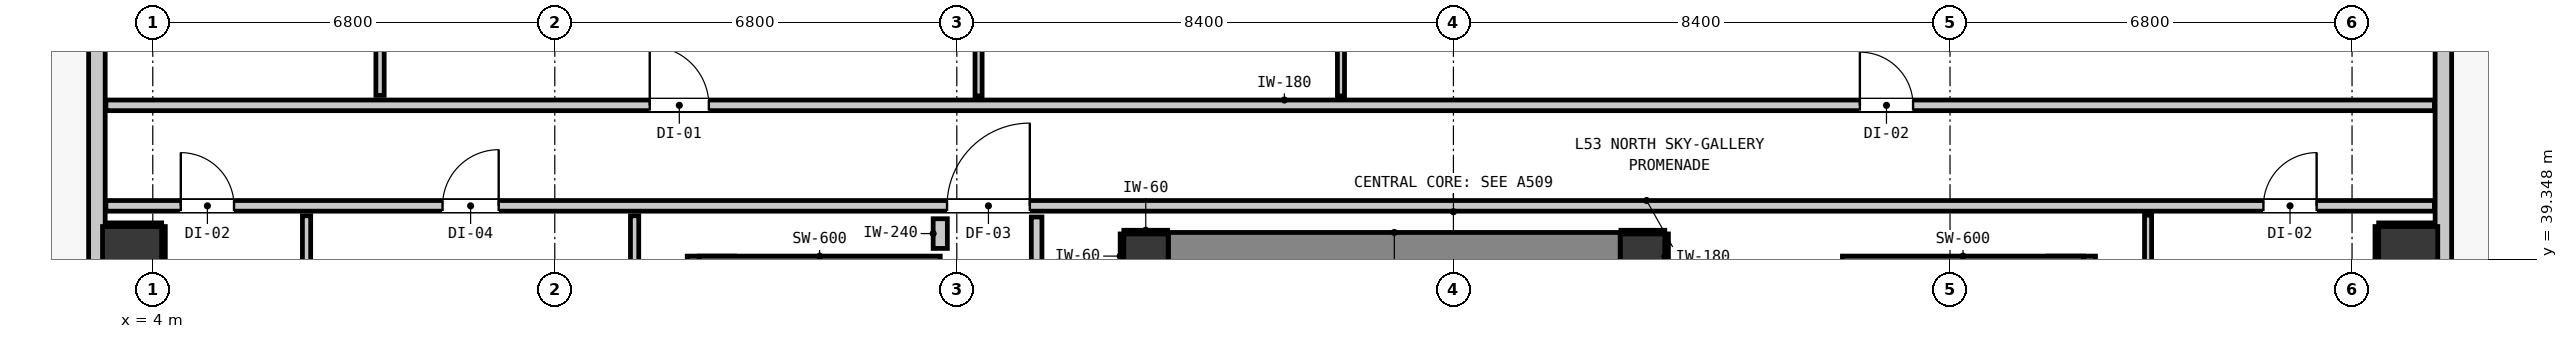
"""IFC4 building model, lengths in metres.
Left out: names, types, materials, properties, quantities, classifications, styles, units other than length and angle.
Written with IfcOpenShell. Run it as: python <this file> out.ifc"""

import sys

from ifc_helpers import new_model, si_unit, direction, frame, frame_2d, origin, origin_2d, place, context, subcontext, project, spatial, rectangle, extrude, element, fill, save


model = new_model("IFC4")
c1 = context("Model", 3, precision=1e-05, world=origin(), true_north=direction((0.0, 1.0)))
c2 = subcontext(c1, "Body", "Model", "MODEL_VIEW")
j1 = project(units=[si_unit("LENGTHUNIT", "METRE"), si_unit("PLANEANGLEUNIT", "RADIAN")], contexts=[c1])
p1 = place(None, origin())
s1 = spatial("IfcSite", under=j1, at=p1, CompositionType="ELEMENT")
p2 = place(p1, origin())
s2 = spatial("IfcBuilding", under=s1, at=p2, CompositionType="ELEMENT")
p3 = place(p2, frame((0.0, 0.0, 183.52)))
s3 = spatial("IfcBuildingStorey", under=s2, at=p3, CompositionType="ELEMENT", Elevation=183.52)
for number, where, z_axis, x_axis in (
    (1, (20.8, 39.4, 0.0), (0.0, 0.0, 1.0), (1.0, 0.0, 0.0)),
    (2, (29.2, 39.4, 0.0), (0.0, 0.0, 1.0), (1.0, 0.0, 0.0)),
):
    element("IfcColumn", number, at=place(p3, frame(where, z_axis=z_axis, x_axis=x_axis)), inside=s3, PredefinedType="COLUMN", context=c2, shape_type="SweptSolid", body=[
        extrude(rectangle(XDim=0.75, YDim=0.75, at=origin_2d()), origin(), (0.0, 0.0, 1.0), 3.32),
    ])
p4 = place(p3, frame((13.44, 31.08, 0.0), z_axis=(0.0, 0.0, 1.0), x_axis=(0.0, 1.0, 0.0)))
e3 = element("IfcWall", 3, at=p4, inside=s3, PredefinedType="SHEAR", context=c2, shape_type="SweptSolid", body=[
    extrude(rectangle(XDim=8.32, YDim=0.8, at=frame_2d((4.16, 0.0))), origin(), (0.0, 0.0, 1.0), 3.32),
])
p5 = place(p3, frame((13.24, 39.1, 0.0), z_axis=(0.0, 0.0, 1.0), x_axis=(1.0, 0.0, 0.0)))
e4 = element("IfcWall", 4, at=p5, inside=s3, PredefinedType="SHEAR", context=c2, shape_type="SweptSolid", body=[
    extrude(rectangle(XDim=4.08, YDim=0.6, at=frame_2d((2.04, 0.0))), origin(), (0.0, 0.0, 1.0), 3.32),
])
p6 = place(p3, frame((36.46, 31.08, 0.0), z_axis=(0.0, 0.0, 1.0), x_axis=(0.0, 1.0, 0.0)))
e5 = element("IfcWall", 5, at=p6, inside=s3, PredefinedType="SHEAR", context=c2, shape_type="SweptSolid", body=[
    extrude(rectangle(XDim=8.32, YDim=0.8, at=frame_2d((4.16, 0.0))), origin(), (0.0, 0.0, 1.0), 3.32),
])
p7 = place(p3, frame((32.58, 39.1, 0.0), z_axis=(0.0, 0.0, 1.0), x_axis=(1.0, 0.0, 0.0)))
e6 = element("IfcWall", 6, at=p7, inside=s3, PredefinedType="SHEAR", context=c2, shape_type="SweptSolid", body=[
    extrude(rectangle(XDim=4.08, YDim=0.6, at=frame_2d((2.04, 0.0))), origin(), (0.0, 0.0, 1.0), 3.32),
])
p8 = place(p3, frame((21.18, 39.4, 0.0), z_axis=(0.0, 0.0, 1.0), x_axis=(1.0, 0.0, 0.0)))
e7 = element("IfcWall", 7, at=p8, inside=s3, PredefinedType="SHEAR", context=c2, shape_type="SweptSolid", body=[
    extrude(rectangle(XDim=7.64, YDim=0.8, at=frame_2d((3.82, 0.0))), origin(), (0.0, 0.0, 1.0), 3.32),
])
for number, where, z_axis, x_axis in (
    (8, (3.65, 39.4, 0.0), (0.0, 0.0, 1.0), (1.0, 0.0, 0.0)),
    (9, (42.15, 39.4, 0.0), (0.0, 0.0, 1.0), (1.0, 0.0, 0.0)),
):
    element("IfcColumn", number, at=place(p3, frame(where, z_axis=z_axis, x_axis=x_axis)), inside=s3, PredefinedType="COLUMN", context=c2, shape_type="SweptSolid", body=[
        extrude(rectangle(XDim=1.0, YDim=1.0, at=origin_2d()), origin(), (0.0, 0.0, 1.0), 3.32),
    ])
p9 = place(p3, frame((3.055, 17.555, 0.0), z_axis=(0.0, 0.0, 1.0), x_axis=(0.0, 1.0, 0.0)))
e10 = element("IfcWall", 10, at=p9, inside=s3, PredefinedType="STANDARD", context=c2, shape_type="SweptSolid", body=[
    extrude(rectangle(XDim=32.29, YDim=0.28, at=frame_2d((16.145, 0.0))), origin(), (0.0, 0.0, 1.0), 3.08),
])
p10 = place(p9, frame((5.467, 0.0, 0.0)))
e11 = element("IfcOpeningElement", 11, at=p10, cuts=e10, PredefinedType="OPENING", context=c2, shape_type="SweptSolid", body=[
    extrude(rectangle(XDim=1.0, YDim=2.15, at=frame_2d((0.5, 1.075))), frame((0.0, 0.15, 0.0), z_axis=(0.0, -1.0, 0.0), x_axis=(1.0, 0.0, 0.0)), (0.0, 0.0, 1.0), 0.3),
])
p11 = place(p9, frame((30.247, 0.0, 0.85)))
e12 = element("IfcOpeningElement", 12, at=p11, cuts=e10, PredefinedType="OPENING", context=c2, shape_type="SweptSolid", body=[
    extrude(rectangle(XDim=1.05, YDim=1.65, at=frame_2d((0.525, 0.825))), frame((0.0, 0.15, 0.0), z_axis=(0.0, -1.0, 0.0), x_axis=(1.0, 0.0, 0.0)), (0.0, 0.0, 1.0), 0.3),
])
p12 = place(p9, frame((9.131, 0.0, 0.85)))
e13 = element("IfcOpeningElement", 13, at=p12, cuts=e10, PredefinedType="OPENING", context=c2, shape_type="SweptSolid", body=[
    extrude(rectangle(XDim=1.05, YDim=1.65, at=frame_2d((0.525, 0.825))), frame((0.0, 0.15, 0.0), z_axis=(0.0, -1.0, 0.0), x_axis=(1.0, 0.0, 0.0)), (0.0, 0.0, 1.0), 0.3),
])
p13 = place(p3, frame((42.745, 49.845, 0.0), z_axis=(0.0, 0.0, 1.0), x_axis=(0.0, -1.0, 0.0)))
e14 = element("IfcWall", 14, at=p13, inside=s3, PredefinedType="STANDARD", context=c2, shape_type="SweptSolid", body=[
    extrude(rectangle(XDim=32.29, YDim=0.28, at=frame_2d((16.145, 0.0))), origin(), (0.0, 0.0, 1.0), 3.08),
])
p14 = place(p13, frame((0.904, 0.0, 0.0)))
e15 = element("IfcOpeningElement", 15, at=p14, cuts=e14, PredefinedType="OPENING", context=c2, shape_type="SweptSolid", body=[
    extrude(rectangle(XDim=1.0, YDim=2.15, at=frame_2d((0.5, 1.075))), frame((0.0, 0.15, 0.0), z_axis=(0.0, -1.0, 0.0), x_axis=(1.0, 0.0, 0.0)), (0.0, 0.0, 1.0), 0.3),
])
p15 = place(p13, frame((30.822, 0.0, 0.85)))
e16 = element("IfcOpeningElement", 16, at=p15, cuts=e14, PredefinedType="OPENING", context=c2, shape_type="SweptSolid", body=[
    extrude(rectangle(XDim=1.05, YDim=1.65, at=frame_2d((0.525, 0.825))), frame((0.0, 0.15, 0.0), z_axis=(0.0, -1.0, 0.0), x_axis=(1.0, 0.0, 0.0)), (0.0, 0.0, 1.0), 0.3),
])
p16 = place(p13, frame((4.424, 0.0, 0.85)))
e17 = element("IfcOpeningElement", 17, at=p16, cuts=e14, PredefinedType="OPENING", context=c2, shape_type="SweptSolid", body=[
    extrude(rectangle(XDim=1.05, YDim=1.65, at=frame_2d((0.525, 0.825))), frame((0.0, 0.15, 0.0), z_axis=(0.0, -1.0, 0.0), x_axis=(1.0, 0.0, 0.0)), (0.0, 0.0, 1.0), 0.3),
])
p17 = place(p13, frame((24.724, 0.0, 0.85)))
e18 = element("IfcOpeningElement", 18, at=p17, cuts=e14, PredefinedType="OPENING", context=c2, shape_type="SweptSolid", body=[
    extrude(rectangle(XDim=1.05, YDim=1.65, at=frame_2d((0.525, 0.825))), frame((0.0, 0.15, 0.0), z_axis=(0.0, -1.0, 0.0), x_axis=(1.0, 0.0, 0.0)), (0.0, 0.0, 1.0), 0.3),
])
p18 = place(p3, frame((3.207, 40.25, 0.0), z_axis=(0.0, 0.0, 1.0), x_axis=(1.0, 0.0, 0.0)))
e19 = element("IfcWall", 19, at=p18, inside=s3, PredefinedType="PARTITIONING", context=c2, shape_type="SweptSolid", body=[
    extrude(rectangle(XDim=39.386, YDim=0.18, at=frame_2d((19.693, 0.0))), origin(), (0.0, 0.0, 1.0), 3.08),
])
p19 = place(p18, frame((14.228, 0.0, 0.0)))
e20 = element("IfcOpeningElement", 20, at=p19, cuts=e19, PredefinedType="OPENING", context=c2, shape_type="SweptSolid", body=[
    extrude(rectangle(XDim=1.4, YDim=2.15, at=frame_2d((0.7, 1.075))), frame((0.0, 0.1, 0.0), z_axis=(0.0, -1.0, 0.0), x_axis=(1.0, 0.0, 0.0)), (0.0, 0.0, 1.0), 0.2),
])
p20 = place(p18, frame((1.267, 0.0, 0.0)))
e21 = element("IfcOpeningElement", 21, at=p20, cuts=e19, PredefinedType="OPENING", context=c2, shape_type="SweptSolid", body=[
    extrude(rectangle(XDim=0.9, YDim=2.1, at=frame_2d((0.45, 1.05))), frame((0.0, 0.1, 0.0), z_axis=(0.0, -1.0, 0.0), x_axis=(1.0, 0.0, 0.0)), (0.0, 0.0, 1.0), 0.2),
])
p21 = place(p18, frame((5.694, 0.0, 0.0)))
e22 = element("IfcOpeningElement", 22, at=p21, cuts=e19, PredefinedType="OPENING", context=c2, shape_type="SweptSolid", body=[
    extrude(rectangle(XDim=0.95, YDim=2.1, at=frame_2d((0.475, 1.05))), frame((0.0, 0.1, 0.0), z_axis=(0.0, -1.0, 0.0), x_axis=(1.0, 0.0, 0.0)), (0.0, 0.0, 1.0), 0.2),
])
p22 = place(p18, frame((36.494, 0.0, 0.0)))
e23 = element("IfcOpeningElement", 23, at=p22, cuts=e19, PredefinedType="OPENING", context=c2, shape_type="SweptSolid", body=[
    extrude(rectangle(XDim=0.9, YDim=2.1, at=frame_2d((0.45, 1.05))), frame((0.0, 0.1, 0.0), z_axis=(0.0, -1.0, 0.0), x_axis=(1.0, 0.0, 0.0)), (0.0, 0.0, 1.0), 0.2),
])
p23 = place(p3, frame((3.207, 41.95, 0.0), z_axis=(0.0, 0.0, 1.0), x_axis=(1.0, 0.0, 0.0)))
e24 = element("IfcWall", 24, at=p23, inside=s3, PredefinedType="PARTITIONING", context=c2, shape_type="SweptSolid", body=[
    extrude(rectangle(XDim=39.386, YDim=0.18, at=frame_2d((19.693, 0.0))), origin(), (0.0, 0.0, 1.0), 3.08),
])
p24 = place(p23, frame((9.199, 0.0, 0.0)))
e25 = element("IfcOpeningElement", 25, at=p24, cuts=e24, PredefinedType="OPENING", context=c2, shape_type="SweptSolid", body=[
    extrude(rectangle(XDim=1.0, YDim=2.15, at=frame_2d((0.5, 1.075))), frame((0.0, 0.1, 0.0), z_axis=(0.0, -1.0, 0.0), x_axis=(1.0, 0.0, 0.0)), (0.0, 0.0, 1.0), 0.2),
])
p25 = place(p23, frame((29.668, 0.0, 0.0)))
e26 = element("IfcOpeningElement", 26, at=p25, cuts=e24, PredefinedType="OPENING", context=c2, shape_type="SweptSolid", body=[
    extrude(rectangle(XDim=0.9, YDim=2.1, at=frame_2d((0.45, 1.05))), frame((0.0, 0.1, 0.0), z_axis=(0.0, -1.0, 0.0), x_axis=(1.0, 0.0, 0.0)), (0.0, 0.0, 1.0), 0.2),
])
p26 = place(p3, frame((17.32, 39.53, 0.0), z_axis=(0.0, 0.0, 1.0), x_axis=(0.0, 1.0, 0.0)))
e27 = element("IfcWall", 27, at=p26, inside=s3, PredefinedType="PARTITIONING", context=c2, shape_type="SweptSolid", body=[
    extrude(rectangle(XDim=0.502, YDim=0.24, at=frame_2d((0.251, 0.0))), origin(), (0.0, 0.0, 1.0), 3.08),
])
p27 = place(p3, frame((18.95, 39.058, 0.0), z_axis=(0.0, 0.0, 1.0), x_axis=(0.0, 1.0, 0.0)))
e28 = element("IfcWall", 28, at=p27, inside=s3, PredefinedType="PARTITIONING", context=c2, shape_type="SweptSolid", body=[
    extrude(rectangle(XDim=1.004, YDim=0.18, at=frame_2d((0.502, 0.0))), origin(), (0.0, 0.0, 1.0), 3.08),
])
p28 = place(p3, frame((6.601, 34.648, 0.0), z_axis=(0.0, 0.0, 1.0), x_axis=(0.0, 1.0, 0.0)))
e29 = element("IfcWall", 29, at=p28, inside=s3, PredefinedType="PARTITIONING", context=c2, shape_type="SweptSolid", body=[
    extrude(rectangle(XDim=5.434, YDim=0.14, at=frame_2d((2.717, 0.0))), origin(), (0.0, 0.0, 1.0), 3.08),
])
p29 = place(p3, frame((7.844, 42.118, 0.0), z_axis=(0.0, 0.0, 1.0), x_axis=(0.0, 1.0, 0.0)))
e30 = element("IfcWall", 30, at=p29, inside=s3, PredefinedType="PARTITIONING", context=c2, shape_type="SweptSolid", body=[
    extrude(rectangle(XDim=4.534, YDim=0.14, at=frame_2d((2.267, 0.0))), origin(), (0.0, 0.0, 1.0), 3.08),
])
p30 = place(p29, frame((1.827, 0.0, 0.0)))
e31 = element("IfcOpeningElement", 31, at=p30, cuts=e30, PredefinedType="OPENING", context=c2, shape_type="SweptSolid", body=[
    extrude(rectangle(XDim=0.86, YDim=2.02, at=frame_2d((0.43, 1.01))), frame((0.0, 0.08, 0.0), z_axis=(0.0, -1.0, 0.0), x_axis=(1.0, 0.0, 0.0)), (0.0, 0.0, 1.0), 0.16),
])
p31 = place(p3, frame((12.15, 34.648, 0.0), z_axis=(0.0, 0.0, 1.0), x_axis=(0.0, 1.0, 0.0)))
e32 = element("IfcWall", 32, at=p31, inside=s3, PredefinedType="PARTITIONING", context=c2, shape_type="SweptSolid", body=[
    extrude(rectangle(XDim=5.434, YDim=0.14, at=frame_2d((2.717, 0.0))), origin(), (0.0, 0.0, 1.0), 3.08),
])
p32 = place(p3, frame((17.968, 42.108, 0.0), z_axis=(0.0, 0.0, 1.0), x_axis=(0.0, 1.0, 0.0)))
e33 = element("IfcWall", 33, at=p32, inside=s3, PredefinedType="PARTITIONING", context=c2, shape_type="SweptSolid", body=[
    extrude(rectangle(XDim=4.554, YDim=0.12, at=frame_2d((2.277, 0.0))), origin(), (0.0, 0.0, 1.0), 3.08),
])
p33 = place(p32, frame((1.817, 0.0, 0.0)))
e34 = element("IfcOpeningElement", 34, at=p33, cuts=e33, PredefinedType="OPENING", context=c2, shape_type="SweptSolid", body=[
    extrude(rectangle(XDim=0.9, YDim=2.1, at=frame_2d((0.45, 1.05))), frame((0.0, 0.07, 0.0), z_axis=(0.0, -1.0, 0.0), x_axis=(1.0, 0.0, 0.0)), (0.0, 0.0, 1.0), 0.14),
])
p34 = place(p3, frame((24.098, 42.108, 0.0), z_axis=(0.0, 0.0, 1.0), x_axis=(0.0, 1.0, 0.0)))
e35 = element("IfcWall", 35, at=p34, inside=s3, PredefinedType="PARTITIONING", context=c2, shape_type="SweptSolid", body=[
    extrude(rectangle(XDim=4.554, YDim=0.12, at=frame_2d((2.277, 0.0))), origin(), (0.0, 0.0, 1.0), 3.08),
])
p35 = place(p3, frame((37.75, 32.138, 0.0), z_axis=(0.0, 0.0, 1.0), x_axis=(0.0, 1.0, 0.0)))
e36 = element("IfcWall", 36, at=p35, inside=s3, PredefinedType="PARTITIONING", context=c2, shape_type="SweptSolid", body=[
    extrude(rectangle(XDim=7.954, YDim=0.12, at=frame_2d((3.977, 0.0))), origin(), (0.0, 0.0, 1.0), 3.08),
])
p36 = place(p3, frame((20.425, 39.807, 0.0), z_axis=(0.0, 0.0, 1.0), x_axis=(1.0, 0.0, 0.0)))
e37 = element("IfcWall", 37, at=p36, inside=s3, PredefinedType="PARTITIONING", context=c2, shape_type="SweptSolid", body=[
    extrude(rectangle(XDim=0.742, YDim=0.06, at=frame_2d((0.371, 0.0))), origin(), (0.0, 0.0, 1.0), 1.45),
])
p37 = place(p3, frame((20.393, 39.025, 0.0), z_axis=(0.0, 0.0, 1.0), x_axis=(0.0, 1.0, 0.0)))
e38 = element("IfcWall", 38, at=p37, inside=s3, PredefinedType="PARTITIONING", context=c2, shape_type="SweptSolid", body=[
    extrude(rectangle(XDim=0.75, YDim=0.06, at=frame_2d((0.375, 0.0))), origin(), (0.0, 0.0, 1.0), 1.45),
])
p38 = place(p3, frame((28.833, 39.807, 0.0), z_axis=(0.0, 0.0, 1.0), x_axis=(1.0, 0.0, 0.0)))
e39 = element("IfcWall", 39, at=p38, inside=s3, PredefinedType="PARTITIONING", context=c2, shape_type="SweptSolid", body=[
    extrude(rectangle(XDim=0.742, YDim=0.06, at=frame_2d((0.371, 0.0))), origin(), (0.0, 0.0, 1.0), 1.45),
])
p39 = place(p3, frame((29.607, 39.025, 0.0), z_axis=(0.0, 0.0, 1.0), x_axis=(0.0, 1.0, 0.0)))
e40 = element("IfcWall", 40, at=p39, inside=s3, PredefinedType="PARTITIONING", context=c2, shape_type="SweptSolid", body=[
    extrude(rectangle(XDim=0.75, YDim=0.06, at=frame_2d((0.375, 0.0))), origin(), (0.0, 0.0, 1.0), 1.45),
])
p40 = place(p3, frame((3.21, 39.932, 0.0), z_axis=(0.0, 0.0, 1.0), x_axis=(1.0, 0.0, 0.0)))
e41 = element("IfcWall", 41, at=p40, inside=s3, PredefinedType="PARTITIONING", context=c2, shape_type="SweptSolid", body=[
    extrude(rectangle(XDim=0.94, YDim=0.06, at=frame_2d((0.47, 0.0))), origin(), (0.0, 0.0, 1.0), 1.45),
])
p41 = place(p3, frame((4.182, 38.9, 0.0), z_axis=(0.0, 0.0, 1.0), x_axis=(0.0, 1.0, 0.0)))
e42 = element("IfcWall", 42, at=p41, inside=s3, PredefinedType="PARTITIONING", context=c2, shape_type="SweptSolid", body=[
    extrude(rectangle(XDim=1.0, YDim=0.06, at=frame_2d((0.5, 0.0))), origin(), (0.0, 0.0, 1.0), 1.45),
])
p42 = place(p3, frame((41.65, 39.932, 0.0), z_axis=(0.0, 0.0, 1.0), x_axis=(1.0, 0.0, 0.0)))
e43 = element("IfcWall", 43, at=p42, inside=s3, PredefinedType="PARTITIONING", context=c2, shape_type="SweptSolid", body=[
    extrude(rectangle(XDim=0.94, YDim=0.06, at=frame_2d((0.47, 0.0))), origin(), (0.0, 0.0, 1.0), 1.45),
])
p43 = place(p3, frame((41.618, 38.9, 0.0), z_axis=(0.0, 0.0, 1.0), x_axis=(0.0, 1.0, 0.0)))
e44 = element("IfcWall", 44, at=p43, inside=s3, PredefinedType="PARTITIONING", context=c2, shape_type="SweptSolid", body=[
    extrude(rectangle(XDim=1.0, YDim=0.06, at=frame_2d((0.5, 0.0))), origin(), (0.0, 0.0, 1.0), 1.45),
])
p44 = place(p19, origin())
e45 = element("IfcDoor", 45, at=p44, inside=s3, OperationType="SINGLE_SWING_RIGHT", PredefinedType="DOOR", context=c2, shape_type="SweptSolid", body=[
    extrude(rectangle(XDim=1.4, YDim=2.15, at=frame_2d((0.7, 1.075))), frame((0.0, 0.025, 0.0), z_axis=(0.0, -1.0, 0.0), x_axis=(1.0, 0.0, 0.0)), (0.0, 0.0, 1.0), 0.05),
])
fill(e20, e45)
p45 = place(p24, origin())
e46 = element("IfcDoor", 46, at=p45, inside=s3, OperationType="SINGLE_SWING_LEFT", PredefinedType="DOOR", context=c2, shape_type="SweptSolid", body=[
    extrude(rectangle(XDim=1.0, YDim=2.15, at=frame_2d((0.5, 1.075))), frame((0.0, 0.025, 0.0), z_axis=(0.0, -1.0, 0.0), x_axis=(1.0, 0.0, 0.0)), (0.0, 0.0, 1.0), 0.05),
])
fill(e25, e46)
p46 = place(p25, origin())
e47 = element("IfcDoor", 47, at=p46, inside=s3, OperationType="SINGLE_SWING_LEFT", PredefinedType="DOOR", context=c2, shape_type="SweptSolid", body=[
    extrude(rectangle(XDim=0.9, YDim=2.1, at=frame_2d((0.45, 1.05))), frame((0.0, 0.025, 0.0), z_axis=(0.0, -1.0, 0.0), x_axis=(1.0, 0.0, 0.0)), (0.0, 0.0, 1.0), 0.05),
])
fill(e26, e47)
p47 = place(p20, origin())
e48 = element("IfcDoor", 48, at=p47, inside=s3, OperationType="SINGLE_SWING_LEFT", PredefinedType="DOOR", context=c2, shape_type="SweptSolid", body=[
    extrude(rectangle(XDim=0.9, YDim=2.1, at=frame_2d((0.45, 1.05))), frame((0.0, 0.025, 0.0), z_axis=(0.0, -1.0, 0.0), x_axis=(1.0, 0.0, 0.0)), (0.0, 0.0, 1.0), 0.05),
])
fill(e21, e48)
p48 = place(p21, origin())
e49 = element("IfcDoor", 49, at=p48, inside=s3, OperationType="SINGLE_SWING_RIGHT", PredefinedType="DOOR", context=c2, shape_type="SweptSolid", body=[
    extrude(rectangle(XDim=0.95, YDim=2.1, at=frame_2d((0.475, 1.05))), frame((0.0, 0.025, 0.0), z_axis=(0.0, -1.0, 0.0), x_axis=(1.0, 0.0, 0.0)), (0.0, 0.0, 1.0), 0.05),
])
fill(e22, e49)
p49 = place(p22, origin())
e50 = element("IfcDoor", 50, at=p49, inside=s3, OperationType="SINGLE_SWING_RIGHT", PredefinedType="DOOR", context=c2, shape_type="SweptSolid", body=[
    extrude(rectangle(XDim=0.9, YDim=2.1, at=frame_2d((0.45, 1.05))), frame((0.0, 0.025, 0.0), z_axis=(0.0, -1.0, 0.0), x_axis=(1.0, 0.0, 0.0)), (0.0, 0.0, 1.0), 0.05),
])
fill(e23, e50)
save(model, sys.argv[1])
